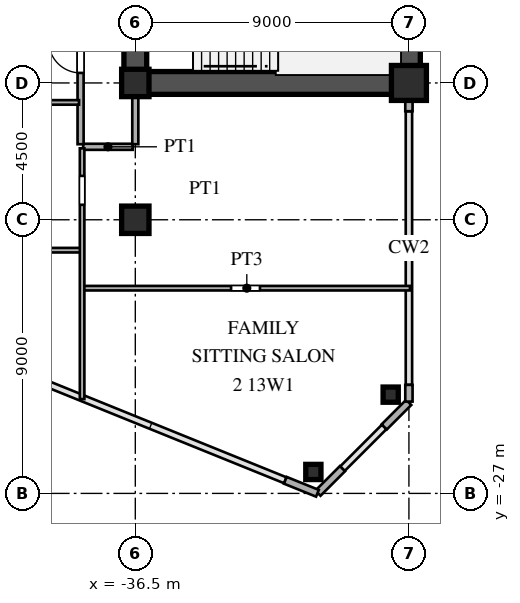
"""IFC4 building model, lengths in metres.
Left out: names, types, materials, properties, quantities, classifications, styles, units other than length and angle.
Written with IfcOpenShell. Run it as: python <this file> out.ifc"""

import sys

from ifc_helpers import new_model, si_unit, direction, frame, frame_2d, origin, origin_2d, place, context, subcontext, project, spatial, rectangle, hollow_rectangle, i_section, extrude, source, transform, mapped, element, fill, save


model = new_model("IFC4")
c1 = context("Model", 3, precision=1e-05, world=origin(), true_north=direction((0.0, 1.0)))
c2 = subcontext(c1, "Body", "Model", "MODEL_VIEW")
j1 = project(units=[si_unit("LENGTHUNIT", "METRE"), si_unit("PLANEANGLEUNIT", "RADIAN")], contexts=[c1])
p1 = place(None, origin())
s1 = spatial("IfcSite", under=j1, at=p1, CompositionType="ELEMENT")
p2 = place(p1, origin())
s2 = spatial("IfcBuilding", under=s1, at=p2, CompositionType="ELEMENT")
p3 = place(p2, frame((0.0, 0.0, 51.3)))
s3 = spatial("IfcBuildingStorey", under=s2, at=p3, CompositionType="ELEMENT", Elevation=51.3)
m1 = source(origin(), c2, "Body", "SweptSolid", [
    extrude(hollow_rectangle(XDim=1.15, YDim=1.15, WallThickness=0.048, at=origin_2d()), origin(), (0.0, 0.0, 1.0), 3.6),
])
p4 = place(p3, frame((-27.5, -13.5, 0.0), z_axis=(0.0, 0.0, 1.0), x_axis=(1.0, 0.0, 0.0)))
e1 = element("IfcColumn", 1, at=p4, inside=s3, PredefinedType="COLUMN", context=c2, shape_type="MappedRepresentation", body=[
    mapped(m1, transform((0.0, 0.0, 0.0), scale=1.0)),
])
m2 = source(origin(), c2, "Body", "SweptSolid", [
    extrude(i_section(OverallWidth=0.9, OverallDepth=0.9, WebThickness=0.036, FlangeThickness=0.055, at=origin_2d()), origin(), (0.0, 0.0, 1.0), 3.6),
])
for number, where, z_axis, x_axis in (
    (2, (-36.5, -18.0, 0.0), (0.0, 0.0, 1.0), (1.0, 0.0, 0.0)),
    (3, (-36.5, -13.5, 0.0), (0.0, 0.0, 1.0), (1.0, 0.0, 0.0)),
):
    element("IfcColumn", number, at=place(p3, frame(where, z_axis=z_axis, x_axis=x_axis)), inside=s3, PredefinedType="COLUMN", context=c2, shape_type="MappedRepresentation", body=[
        mapped(m2, transform((0.0, 0.0, 0.0), scale=1.0)),
    ])
m3 = source(origin(), c2, "Body", "SweptSolid", [
    extrude(hollow_rectangle(XDim=0.5, YDim=0.5, WallThickness=0.02, at=origin_2d()), origin(), (0.0, 0.0, 1.0), 3.6),
])
for number, where, z_axis, x_axis in (
    (4, (-28.1, -23.751, 0.0), (0.0, 0.0, 1.0), (1.0, 0.0, 0.0)),
    (5, (-30.643, -26.295, 0.0), (0.0, 0.0, 1.0), (1.0, 0.0, 0.0)),
):
    element("IfcColumn", number, at=place(p3, frame(where, z_axis=z_axis, x_axis=x_axis)), inside=s3, PredefinedType="COLUMN", context=c2, shape_type="MappedRepresentation", body=[
        mapped(m3, transform((0.0, 0.0, 0.0), scale=1.0)),
    ])
p5 = place(p3, frame((-27.5, -23.98, 0.0), z_axis=(0.0, 0.0, 1.0), x_axis=(0.0, 1.0, 0.0)))
e6 = element("IfcWall", 6, at=p5, inside=s3, PredefinedType="SOLIDWALL", context=c2, shape_type="SweptSolid", body=[
    extrude(rectangle(XDim=0.55, YDim=0.24, at=frame_2d((0.275, 0.0))), origin(), (0.0, 0.0, 1.0), 3.38),
])
p6 = place(p3, frame((-27.5, -14.43, 0.0), z_axis=(0.0, 0.0, 1.0), x_axis=(0.0, 1.0, 0.0)))
e7 = element("IfcWall", 7, at=p6, inside=s3, PredefinedType="SOLIDWALL", context=c2, shape_type="SweptSolid", body=[
    extrude(rectangle(XDim=0.55, YDim=0.24, at=frame_2d((0.275, 0.0))), origin(), (0.0, 0.0, 1.0), 2.88),
])
p7 = place(p3, frame((-31.566, -26.569, 0.0), z_axis=(0.0, 0.0, 1.0), x_axis=(0.927007103665, -0.375043770452, 0.0)))
e8 = element("IfcWall", 8, at=p7, inside=s3, PredefinedType="SOLIDWALL", context=c2, shape_type="SweptSolid", body=[
    extrude(rectangle(XDim=1.14, YDim=0.24, at=frame_2d((0.57, 0.0))), origin(), (0.0, 0.0, 1.0), 3.38),
])
for number, where, z_axis, x_axis in (
    (9, (-30.493, -26.993, 0.0), (0.0, 0.0, 1.0), (0.707, 0.707, 0.0)),
    (10, (-28.313, -24.813, 0.0), (0.0, 0.0, 1.0), (0.707, 0.707, 0.0)),
):
    element("IfcWall", number, at=place(p3, frame(where, z_axis=z_axis, x_axis=x_axis)), inside=s3, PredefinedType="SOLIDWALL", context=c2, shape_type="SweptSolid", body=[
        extrude(rectangle(XDim=1.14, YDim=0.24, at=frame_2d((0.57, 0.0))), origin(), (0.0, 0.0, 1.0), 3.38),
    ])
p8 = place(p3, frame((-27.5, -13.5, 0.0), z_axis=(0.0, 0.0, 1.0), x_axis=(0.0, 1.0, 0.0)))
e11 = element("IfcWall", 11, at=p8, inside=s3, PredefinedType="SHEAR", context=c2, shape_type="SweptSolid", body=[
    extrude(rectangle(XDim=12.2, YDim=0.75, at=frame_2d((6.1, 0.0))), origin(), (0.0, 0.0, 1.0), 3.38),
])
p9 = place(p3, frame((-36.5, -13.5, 0.0), z_axis=(0.0, 0.0, 1.0), x_axis=(1.0, 0.0, 0.0)))
e12 = element("IfcWall", 12, at=p9, inside=s3, PredefinedType="SHEAR", context=c2, shape_type="SweptSolid", body=[
    extrude(rectangle(XDim=9.0, YDim=0.75, at=frame_2d((4.5, 0.0))), origin(), (0.0, 0.0, 1.0), 3.38),
])
p10 = place(p3, frame((-36.5, -13.65, 0.0), z_axis=(0.0, 0.0, 1.0), x_axis=(0.0, 1.0, 0.0)))
e13 = element("IfcWall", 13, at=p10, inside=s3, PredefinedType="SHEAR", context=c2, shape_type="SweptSolid", body=[
    extrude(rectangle(XDim=7.15, YDim=0.75, at=frame_2d((3.575, 0.0))), origin(), (0.0, 0.0, 1.0), 3.38),
])
p11 = place(p10, frame((4.675, 0.0, 0.0)))
e14 = element("IfcOpeningElement", 14, at=p11, cuts=e13, PredefinedType="OPENING", context=c2, shape_type="SweptSolid", body=[
    extrude(rectangle(XDim=1.15, YDim=2.2, at=frame_2d((0.575, 1.1))), frame((0.0, 0.385, 0.0), z_axis=(0.0, -1.0, 0.0), x_axis=(1.0, 0.0, 0.0)), (0.0, 0.0, 1.0), 0.77),
])
p12 = place(p3, frame((-38.2, -20.25, 0.0), z_axis=(0.0, 0.0, 1.0), x_axis=(1.0, 0.0, 0.0)))
e15 = element("IfcWall", 15, at=p12, inside=s3, PredefinedType="PARTITIONING", context=c2, shape_type="SweptSolid", body=[
    extrude(rectangle(XDim=10.735, YDim=0.15, at=frame_2d((5.367, 0.0))), origin(), (0.0, 0.0, 1.0), 3.38),
])
p13 = place(p12, frame((4.85, 0.0, 0.0)))
e16 = element("IfcOpeningElement", 16, at=p13, cuts=e15, PredefinedType="OPENING", context=c2, shape_type="SweptSolid", body=[
    extrude(rectangle(XDim=0.95, YDim=2.15, at=frame_2d((0.475, 1.075))), frame((0.0, 0.085, 0.0), z_axis=(0.0, -1.0, 0.0), x_axis=(1.0, 0.0, 0.0)), (0.0, 0.0, 1.0), 0.17),
])
p14 = place(p3, frame((-44.45, -19.0, 0.0), z_axis=(0.0, 0.0, 1.0), x_axis=(1.0, 0.0, 0.0)))
e17 = element("IfcWall", 17, at=p14, inside=s3, PredefinedType="PARTITIONING", context=c2, shape_type="SweptSolid", body=[
    extrude(rectangle(XDim=6.15, YDim=0.15, at=frame_2d((3.075, 0.0))), origin(), (0.0, 0.0, 1.0), 3.38),
])
p15 = place(p3, frame((-38.215, -15.6, 0.0), z_axis=(0.0, 0.0, 1.0), x_axis=(1.0, 0.0, 0.0)))
e18 = element("IfcWall", 18, at=p15, inside=s3, PredefinedType="PARTITIONING", context=c2, shape_type="SweptSolid", body=[
    extrude(rectangle(XDim=1.63, YDim=0.2, at=frame_2d((0.815, 0.0))), origin(), (0.0, 0.0, 1.0), 3.38),
])
p16 = place(p3, frame((-44.45, -14.14, 0.0), z_axis=(0.0, 0.0, 1.0), x_axis=(1.0, 0.0, 0.0)))
e19 = element("IfcWall", 19, at=p16, inside=s3, PredefinedType="PARTITIONING", context=c2, shape_type="SweptSolid", body=[
    extrude(rectangle(XDim=6.1, YDim=0.15, at=frame_2d((3.05, 0.0))), origin(), (0.0, 0.0, 1.0), 3.38),
])
p17 = place(p16, frame((2.575, 0.0, 0.0)))
e20 = element("IfcOpeningElement", 20, at=p17, cuts=e19, PredefinedType="OPENING", context=c2, shape_type="SweptSolid", body=[
    extrude(rectangle(XDim=0.95, YDim=2.15, at=frame_2d((0.475, 1.075))), frame((0.0, 0.085, 0.0), z_axis=(0.0, -1.0, 0.0), x_axis=(1.0, 0.0, 0.0)), (0.0, 0.0, 1.0), 0.17),
])
p18 = place(p3, frame((-38.3, -15.515, 0.0), z_axis=(0.0, 0.0, 1.0), x_axis=(0.0, 1.0, 0.0)))
e21 = element("IfcWall", 21, at=p18, inside=s3, PredefinedType="PARTITIONING", context=c2, shape_type="SweptSolid", body=[
    extrude(rectangle(XDim=31.03, YDim=0.2, at=frame_2d((15.515, 0.0))), origin(), (0.0, 0.0, 1.0), 3.38),
])
p19 = place(p18, frame((2.345, 0.0, 0.0)))
e22 = element("IfcOpeningElement", 22, at=p19, cuts=e21, PredefinedType="OPENING", context=c2, shape_type="SweptSolid", body=[
    extrude(rectangle(XDim=1.05, YDim=2.25, at=frame_2d((0.525, 1.125))), frame((0.0, 0.11, 0.0), z_axis=(0.0, -1.0, 0.0), x_axis=(1.0, 0.0, 0.0)), (0.0, 0.0, 1.0), 0.22),
])
p20 = place(p18, frame((13.28, 0.0, 0.0)))
e23 = element("IfcOpeningElement", 23, at=p20, cuts=e21, PredefinedType="OPENING", context=c2, shape_type="SweptSolid", body=[
    extrude(rectangle(XDim=1.05, YDim=2.25, at=frame_2d((0.525, 1.125))), frame((0.0, 0.11, 0.0), z_axis=(0.0, -1.0, 0.0), x_axis=(1.0, 0.0, 0.0)), (0.0, 0.0, 1.0), 0.22),
])
p21 = place(p18, frame((25.567, 0.0, 0.0)))
e24 = element("IfcOpeningElement", 24, at=p21, cuts=e21, PredefinedType="OPENING", context=c2, shape_type="SweptSolid", body=[
    extrude(rectangle(XDim=1.05, YDim=2.25, at=frame_2d((0.525, 1.125))), frame((0.0, 0.11, 0.0), z_axis=(0.0, -1.0, 0.0), x_axis=(1.0, 0.0, 0.0)), (0.0, 0.0, 1.0), 0.22),
])
p22 = place(p3, frame((-38.25, -23.898, 0.0), z_axis=(0.0, 0.0, 1.0), x_axis=(0.0, 1.0, 0.0)))
e25 = element("IfcWall", 25, at=p22, inside=s3, PredefinedType="PARTITIONING", context=c2, shape_type="SweptSolid", body=[
    extrude(rectangle(XDim=8.248, YDim=0.15, at=frame_2d((4.124, 0.0))), origin(), (0.0, 0.0, 1.0), 3.38),
])
p23 = place(p22, frame((6.391, 0.0, 0.0)))
e26 = element("IfcOpeningElement", 26, at=p23, cuts=e25, PredefinedType="OPENING", context=c2, shape_type="SweptSolid", body=[
    extrude(rectangle(XDim=0.95, YDim=2.15, at=frame_2d((0.475, 1.075))), frame((0.0, 0.085, 0.0), z_axis=(0.0, -1.0, 0.0), x_axis=(1.0, 0.0, 0.0)), (0.0, 0.0, 1.0), 0.17),
])
p24 = place(p3, frame((-36.5, -15.515, 0.0), z_axis=(0.0, 0.0, 1.0), x_axis=(0.0, 1.0, 0.0)))
e27 = element("IfcWall", 27, at=p24, inside=s3, PredefinedType="PARTITIONING", context=c2, shape_type="SweptSolid", body=[
    extrude(rectangle(XDim=1.635, YDim=0.2, at=frame_2d((0.817, 0.0))), origin(), (0.0, 0.0, 1.0), 2.68),
])
m4 = source(origin(), c2, "Body", "SweptSolid", [
    extrude(rectangle(XDim=1.05, YDim=2.25, at=frame_2d((0.525, 1.125))), frame((0.0, 0.025, 0.0), z_axis=(0.0, -1.0, 0.0), x_axis=(1.0, 0.0, 0.0)), (0.0, 0.0, 1.0), 0.05),
])
p25 = place(p19, origin())
e28 = element("IfcDoor", 28, at=p25, inside=s3, OperationType="SINGLE_SWING_RIGHT", PredefinedType="DOOR", context=c2, shape_type="MappedRepresentation", body=[
    mapped(m4, transform((0.0, 0.0, 0.0), scale=1.0)),
])
fill(e22, e28)
save(model, sys.argv[1])
